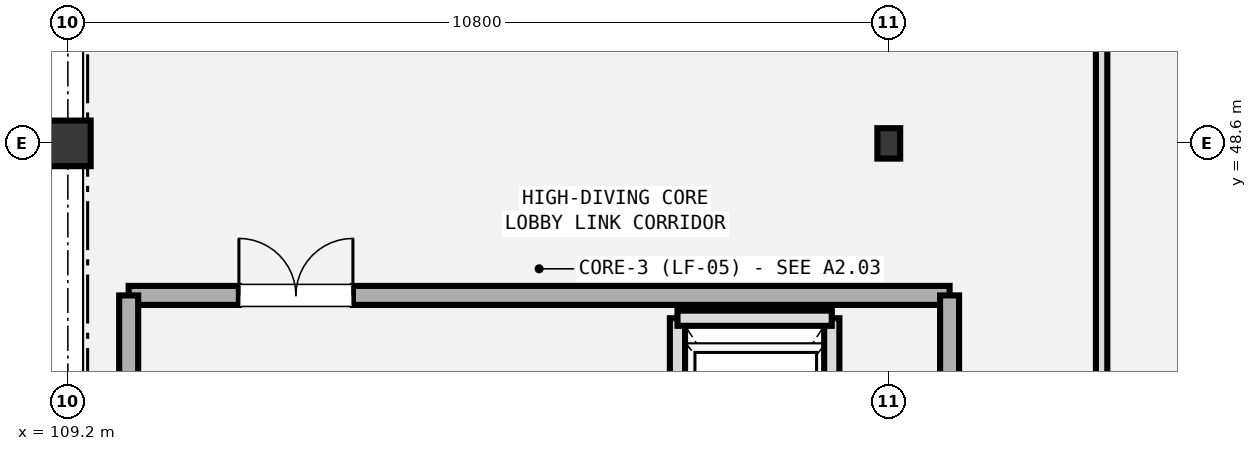
"""IFC4 building model, lengths in metres.
Left out: names, types, materials, properties, quantities, classifications, styles, units other than length and angle.
Written with IfcOpenShell. Run it as: python <this file> out.ifc"""

import sys

from ifc_helpers import new_model, si_unit, direction, frame, frame_2d, origin, origin_2d, place, context, subcontext, project, spatial, rectangle, i_section, extrude, element, fill, save


model = new_model("IFC4")
c1 = context("Model", 3, precision=1e-05, world=origin(), true_north=direction((0.0, 1.0)))
c2 = subcontext(c1, "Body", "Model", "MODEL_VIEW")
j1 = project(units=[si_unit("LENGTHUNIT", "METRE"), si_unit("PLANEANGLEUNIT", "RADIAN")], contexts=[c1])
p1 = place(None, origin())
s1 = spatial("IfcSite", under=j1, at=p1, CompositionType="ELEMENT")
p2 = place(p1, origin())
s2 = spatial("IfcBuilding", under=s1, at=p2, CompositionType="ELEMENT")
p3 = place(p2, frame((0.0, 0.0, 9.6)))
s3 = spatial("IfcBuildingStorey", under=s2, at=p3, CompositionType="ELEMENT", Elevation=9.6)
p4 = place(p3, frame((109.2, 48.6, 0.0), z_axis=(0.0, 0.0, 1.0), x_axis=(1.0, 0.0, 0.0)))
e1 = element("IfcColumn", 1, at=p4, inside=s3, PredefinedType="COLUMN", context=c2, shape_type="SweptSolid", body=[
    extrude(rectangle(XDim=0.6, YDim=0.6, at=origin_2d()), origin(), (0.0, 0.0, 1.0), 4.8),
])
p5 = place(p3, frame((120.0, 48.6, 0.0), z_axis=(0.0, 0.0, 1.0), x_axis=(1.0, 0.0, 0.0)))
e2 = element("IfcColumn", 2, at=p5, inside=s3, PredefinedType="COLUMN", context=c2, shape_type="SweptSolid", body=[
    extrude(i_section(OverallWidth=0.3, OverallDepth=0.4, WebThickness=0.013, FlangeThickness=0.024, FilletRadius=0.027, at=origin_2d()), origin(), (0.0, 0.0, 1.0), 4.8),
])
p6 = place(p3, frame((110.0, 46.6, 0.0), z_axis=(0.0, 0.0, 1.0), x_axis=(1.0, 0.0, 0.0)))
e3 = element("IfcWall", 3, at=p6, inside=s3, PredefinedType="SHEAR", context=c2, shape_type="SweptSolid", body=[
    extrude(rectangle(XDim=10.8, YDim=0.25, at=frame_2d((5.4, 0.0))), origin(), (0.0, 0.0, 1.0), 4.48),
])
p7 = place(p6, frame((1.45, 0.0, 0.0)))
e4 = element("IfcOpeningElement", 4, at=p7, cuts=e3, PredefinedType="OPENING", context=c2, shape_type="SweptSolid", body=[
    extrude(rectangle(XDim=1.5, YDim=2.2, at=frame_2d((0.75, 1.1))), frame((0.0, 0.135, 0.0), z_axis=(0.0, -1.0, 0.0), x_axis=(1.0, 0.0, 0.0)), (0.0, 0.0, 1.0), 0.27),
])
for number, where, z_axis, x_axis in (
    (5, (110.0, 38.0, 0.0), (0.0, 0.0, 1.0), (0.0, 1.0, 0.0)),
    (6, (120.8, 38.0, 0.0), (0.0, 0.0, 1.0), (0.0, 1.0, 0.0)),
):
    element("IfcWall", number, at=place(p3, frame(where, z_axis=z_axis, x_axis=x_axis)), inside=s3, PredefinedType="SHEAR", context=c2, shape_type="SweptSolid", body=[
        extrude(rectangle(XDim=8.6, YDim=0.25, at=frame_2d((4.3, 0.0))), origin(), (0.0, 0.0, 1.0), 4.48),
    ])
p8 = place(p3, frame((117.22, 43.3, 0.0), z_axis=(0.0, 0.0, 1.0), x_axis=(0.0, 1.0, 0.0)))
e7 = element("IfcWall", 7, at=p8, inside=s3, PredefinedType="SOLIDWALL", context=c2, shape_type="SweptSolid", body=[
    extrude(rectangle(XDim=3.0, YDim=0.2, at=frame_2d((1.5, 0.0))), origin(), (0.0, 0.0, 1.0), 4.48),
])
p9 = place(p8, frame((0.95, 0.0, 0.0)))
e8 = element("IfcOpeningElement", 8, at=p9, cuts=e7, PredefinedType="OPENING", context=c2, shape_type="SweptSolid", body=[
    extrude(rectangle(XDim=1.1, YDim=2.2, at=frame_2d((0.55, 1.1))), frame((0.0, 0.11, 0.0), z_axis=(0.0, -1.0, 0.0), x_axis=(1.0, 0.0, 0.0)), (0.0, 0.0, 1.0), 0.22),
])
p10 = place(p3, frame((119.25, 43.3, 0.0), z_axis=(0.0, 0.0, 1.0), x_axis=(0.0, 1.0, 0.0)))
e9 = element("IfcWall", 9, at=p10, inside=s3, PredefinedType="SOLIDWALL", context=c2, shape_type="SweptSolid", body=[
    extrude(rectangle(XDim=3.0, YDim=0.2, at=frame_2d((1.5, 0.0))), origin(), (0.0, 0.0, 1.0), 4.48),
])
p11 = place(p3, frame((117.22, 46.3, 0.0), z_axis=(0.0, 0.0, 1.0), x_axis=(1.0, 0.0, 0.0)))
e10 = element("IfcWall", 10, at=p11, inside=s3, PredefinedType="SOLIDWALL", context=c2, shape_type="SweptSolid", body=[
    extrude(rectangle(XDim=2.03, YDim=0.2, at=frame_2d((1.015, 0.0))), origin(), (0.0, 0.0, 1.0), 4.48),
])
p12 = place(p3, frame((122.8, 37.0, 0.0), z_axis=(0.0, 0.0, 1.0), x_axis=(0.0, 1.0, 0.0)))
e11 = element("IfcWall", 11, at=p12, inside=s3, PredefinedType="PARTITIONING", context=c2, shape_type="SweptSolid", body=[
    extrude(rectangle(XDim=15.45, YDim=0.15, at=frame_2d((7.725, 0.0))), origin(), (0.0, 0.0, 1.0), 4.4),
])
p13 = place(p12, frame((3.5, 0.0, 0.0)))
e12 = element("IfcOpeningElement", 12, at=p13, cuts=e11, PredefinedType="OPENING", context=c2, shape_type="SweptSolid", body=[
    extrude(rectangle(XDim=1.6, YDim=2.2, at=frame_2d((0.8, 1.1))), frame((0.0, 0.085, 0.0), z_axis=(0.0, -1.0, 0.0), x_axis=(1.0, 0.0, 0.0)), (0.0, 0.0, 1.0), 0.17),
])
p14 = place(p7, origin())
e13 = element("IfcDoor", 13, at=p14, inside=s3, OperationType="DOUBLE_DOOR_SINGLE_SWING", PredefinedType="DOOR", context=c2, shape_type="SweptSolid", body=[
    extrude(rectangle(XDim=1.5, YDim=2.2, at=frame_2d((0.75, 1.1))), frame((0.0, 0.025, 0.0), z_axis=(0.0, -1.0, 0.0), x_axis=(1.0, 0.0, 0.0)), (0.0, 0.0, 1.0), 0.05),
])
fill(e4, e13)
save(model, sys.argv[1])
